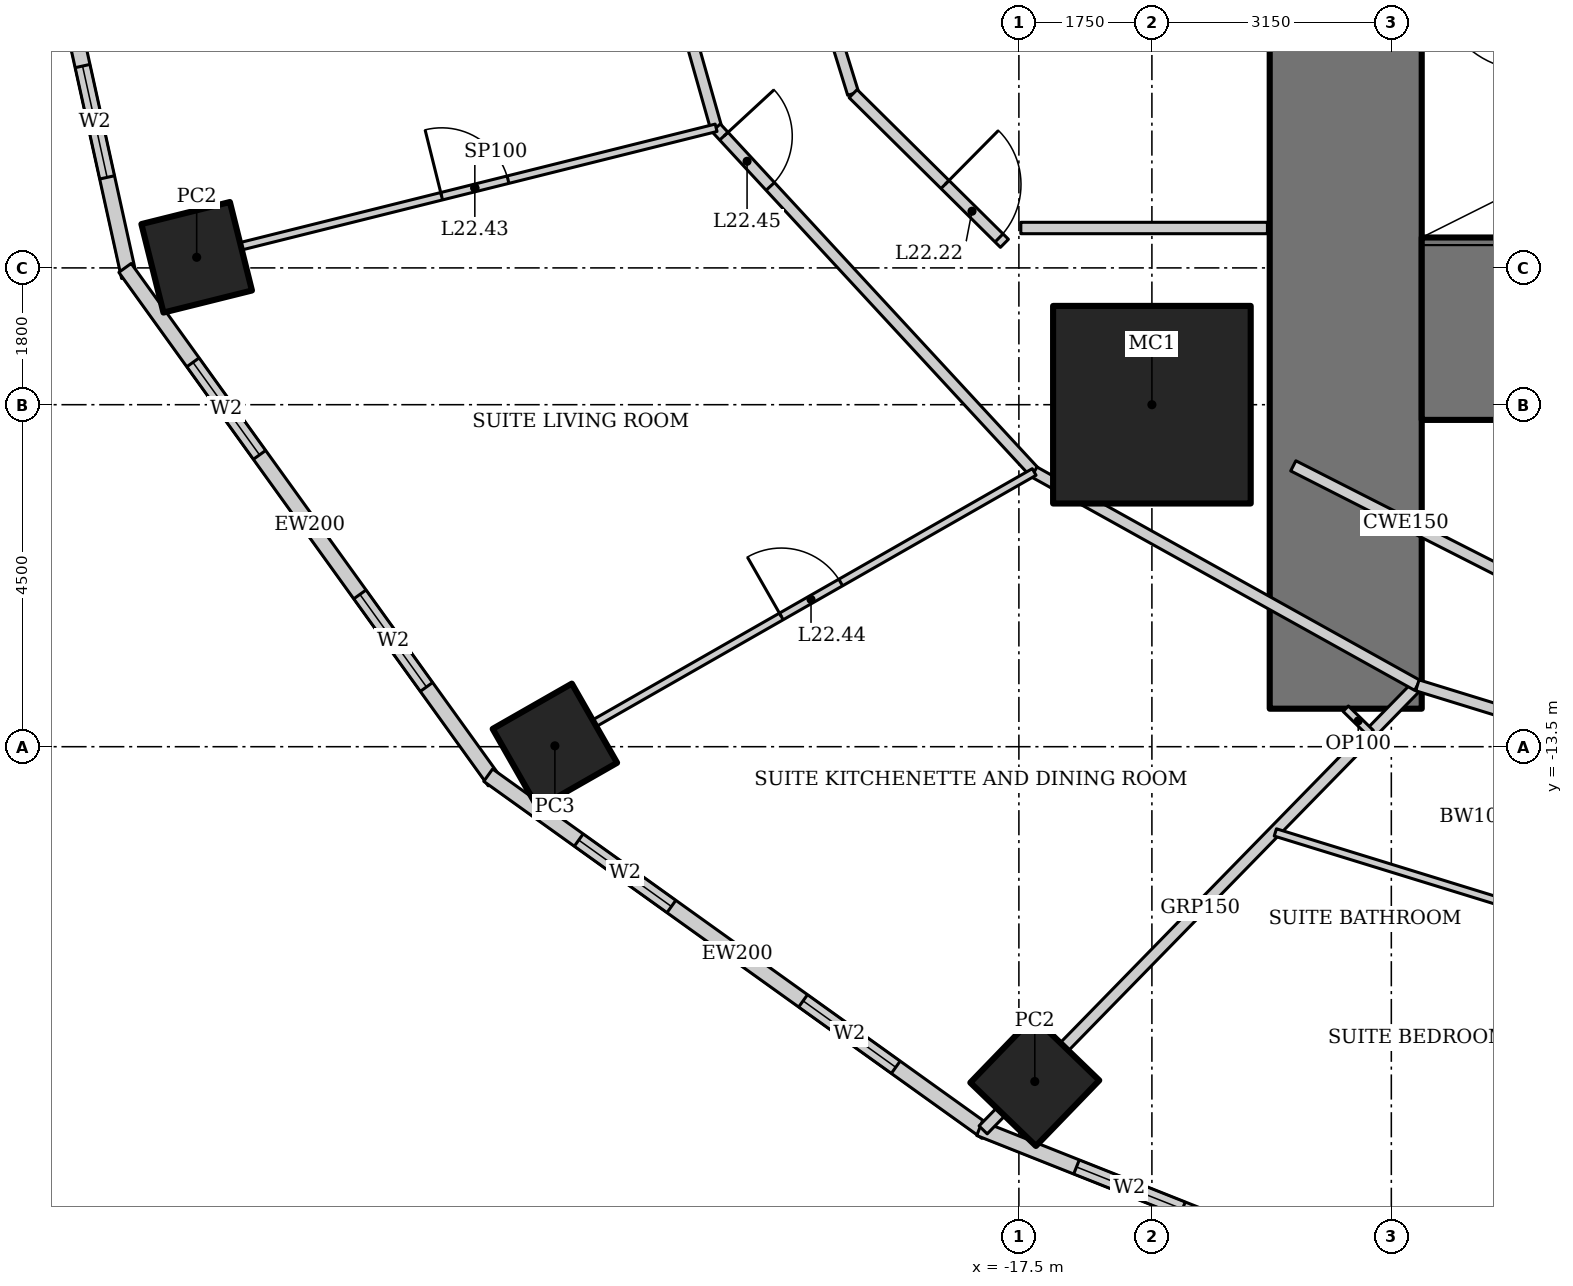
"""IFC4 building model, lengths in metres.
Left out: names, types, materials, properties, quantities, classifications, styles, units other than length and angle.
Written with IfcOpenShell. Run it as: python <this file> out.ifc"""

import sys

from ifc_helpers import new_model, si_unit, direction, frame, frame_2d, origin, origin_2d, place, context, subcontext, project, spatial, rectangle, hollow_rectangle, extrude, element, fill, save


model = new_model("IFC4")
c1 = context("Model", 3, precision=1e-05, world=origin(), true_north=direction((0.0, 1.0)))
c2 = subcontext(c1, "Body", "Model", "MODEL_VIEW")
j1 = project(units=[si_unit("LENGTHUNIT", "METRE"), si_unit("PLANEANGLEUNIT", "RADIAN")], contexts=[c1])
p1 = place(None, origin())
s1 = spatial("IfcSite", under=j1, at=p1, CompositionType="ELEMENT")
p2 = place(p1, origin())
s2 = spatial("IfcBuilding", under=s1, at=p2, CompositionType="ELEMENT")
p3 = place(p2, frame((0.0, 0.0, 94.6)))
s3 = spatial("IfcBuildingStorey", under=s2, at=p3, CompositionType="ELEMENT", Elevation=94.6)
p4 = place(p3, frame((-15.75, -9.0, 0.0), z_axis=(0.0, 0.0, 1.0), x_axis=(1.0, 0.0, 0.0)))
e1 = element("IfcColumn", 1, at=p4, inside=s3, PredefinedType="COLUMN", context=c2, shape_type="SweptSolid", body=[
    extrude(hollow_rectangle(XDim=2.6, YDim=2.6, WallThickness=0.13, at=origin_2d()), origin(), (0.0, 0.0, 1.0), 3.6),
])
p5 = place(p3, frame((-28.318, -7.06, 0.0), z_axis=(0.0, 0.0, 1.0), x_axis=(0.970295726276, 0.2419218956, 0.0)))
e2 = element("IfcColumn", 2, at=p5, inside=s3, PredefinedType="COLUMN", context=c2, shape_type="SweptSolid", body=[
    extrude(hollow_rectangle(XDim=1.2, YDim=1.2, WallThickness=0.1, at=origin_2d()), origin(), (0.0, 0.0, 1.0), 3.6),
])
p6 = place(p3, frame((-23.605, -13.489, 0.0), z_axis=(0.0, 0.0, 1.0), x_axis=(0.86824298017, 0.496139221777, 0.0)))
e3 = element("IfcColumn", 3, at=p6, inside=s3, PredefinedType="COLUMN", context=c2, shape_type="SweptSolid", body=[
    extrude(hollow_rectangle(XDim=1.2, YDim=1.2, WallThickness=0.12, at=origin_2d()), origin(), (0.0, 0.0, 1.0), 3.6),
])
p7 = place(p3, frame((-17.291, -17.905, 0.0), z_axis=(0.0, 0.0, 1.0), x_axis=(0.694658370459, 0.719339800339, 0.0)))
e4 = element("IfcColumn", 4, at=p7, inside=s3, PredefinedType="COLUMN", context=c2, shape_type="SweptSolid", body=[
    extrude(hollow_rectangle(XDim=1.2, YDim=1.2, WallThickness=0.1, at=origin_2d()), origin(), (0.0, 0.0, 1.0), 3.6),
])
p8 = place(p3, frame((-13.2, 13.0, 0.0), z_axis=(0.0, 0.0, 1.0), x_axis=(0.0, -1.0, 0.0)))
e5 = element("IfcWall", 5, at=p8, inside=s3, PredefinedType="SHEAR", context=c2, shape_type="SweptSolid", body=[
    extrude(rectangle(XDim=26.0, YDim=2.0, at=frame_2d((13.0, 0.0))), origin(), (0.0, 0.0, 1.0), 3.6),
])
p9 = place(p8, frame((12.1, 0.0, 0.0)))
e6 = element("IfcOpeningElement", 6, at=p9, cuts=e5, PredefinedType="OPENING", context=c2, shape_type="SweptSolid", body=[
    extrude(rectangle(XDim=1.8, YDim=2.1, at=frame_2d((0.9, 1.05))), frame((0.0, 1.01, 0.0), z_axis=(0.0, -1.0, 0.0), x_axis=(1.0, 0.0, 0.0)), (0.0, 0.0, 1.0), 2.02),
])
p10 = place(p3, frame((-12.2, -8.0, 0.0), z_axis=(0.0, 0.0, 1.0), x_axis=(1.0, 0.0, 0.0)))
e7 = element("IfcWall", 7, at=p10, inside=s3, PredefinedType="SHEAR", context=c2, shape_type="SweptSolid", body=[
    extrude(rectangle(XDim=24.4, YDim=2.4, at=frame_2d((12.2, 0.0))), origin(), (0.0, 0.0, 1.0), 3.6),
])
p11 = place(p3, frame((-30.835, 0.067, 0.0), z_axis=(0.0, 0.0, 1.0), x_axis=(0.215238065514, -0.976561608478, 0.0)))
e8 = element("IfcWall", 8, at=p11, inside=s3, PredefinedType="SOLIDWALL", context=c2, shape_type="SweptSolid", body=[
    extrude(rectangle(XDim=7.562, YDim=0.2, at=frame_2d((3.781, 0.0))), origin(), (0.0, 0.0, 1.0), 3.45),
])
p12 = place(p11, frame((1.341, 0.0, 0.5)))
e9 = element("IfcOpeningElement", 9, at=p12, cuts=e8, PredefinedType="OPENING", context=c2, shape_type="SweptSolid", body=[
    extrude(rectangle(XDim=1.5, YDim=2.2, at=frame_2d((0.75, 1.1))), frame((0.0, 0.11, 0.0), z_axis=(0.0, -1.0, 0.0), x_axis=(1.0, 0.0, 0.0)), (0.0, 0.0, 1.0), 0.22),
])
p13 = place(p11, frame((4.722, 0.0, 0.5)))
e10 = element("IfcOpeningElement", 10, at=p13, cuts=e8, PredefinedType="OPENING", context=c2, shape_type="SweptSolid", body=[
    extrude(rectangle(XDim=1.5, YDim=2.2, at=frame_2d((0.75, 1.1))), frame((0.0, 0.11, 0.0), z_axis=(0.0, -1.0, 0.0), x_axis=(1.0, 0.0, 0.0)), (0.0, 0.0, 1.0), 0.22),
])
p14 = place(p3, frame((-29.26, -7.2, 0.0), z_axis=(0.0, 0.0, 1.0), x_axis=(0.583937613703, -0.811798536155, 0.0)))
e11 = element("IfcWall", 11, at=p14, inside=s3, PredefinedType="SOLIDWALL", context=c2, shape_type="SweptSolid", body=[
    extrude(rectangle(XDim=8.323, YDim=0.2, at=frame_2d((4.162, 0.0))), origin(), (0.0, 0.0, 1.0), 3.45),
])
p15 = place(p14, frame((1.531, 0.0, 0.5)))
e12 = element("IfcOpeningElement", 12, at=p15, cuts=e11, PredefinedType="OPENING", context=c2, shape_type="SweptSolid", body=[
    extrude(rectangle(XDim=1.5, YDim=2.2, at=frame_2d((0.75, 1.1))), frame((0.0, 0.11, 0.0), z_axis=(0.0, -1.0, 0.0), x_axis=(1.0, 0.0, 0.0)), (0.0, 0.0, 1.0), 0.22),
])
p16 = place(p14, frame((5.292, 0.0, 0.5)))
e13 = element("IfcOpeningElement", 13, at=p16, cuts=e11, PredefinedType="OPENING", context=c2, shape_type="SweptSolid", body=[
    extrude(rectangle(XDim=1.5, YDim=2.2, at=frame_2d((0.75, 1.1))), frame((0.0, 0.11, 0.0), z_axis=(0.0, -1.0, 0.0), x_axis=(1.0, 0.0, 0.0)), (0.0, 0.0, 1.0), 0.22),
])
p17 = place(p3, frame((-24.482, -13.875, 0.0), z_axis=(0.0, 0.0, 1.0), x_axis=(0.812791321576, -0.582554948112, 0.0)))
e14 = element("IfcWall", 14, at=p17, inside=s3, PredefinedType="SOLIDWALL", context=c2, shape_type="SweptSolid", body=[
    extrude(rectangle(XDim=8.063, YDim=0.2, at=frame_2d((4.032, 0.0))), origin(), (0.0, 0.0, 1.0), 3.45),
])
p18 = place(p17, frame((1.466, 0.0, 0.5)))
e15 = element("IfcOpeningElement", 15, at=p18, cuts=e14, PredefinedType="OPENING", context=c2, shape_type="SweptSolid", body=[
    extrude(rectangle(XDim=1.5, YDim=2.2, at=frame_2d((0.75, 1.1))), frame((0.0, 0.11, 0.0), z_axis=(0.0, -1.0, 0.0), x_axis=(1.0, 0.0, 0.0)), (0.0, 0.0, 1.0), 0.22),
])
p19 = place(p17, frame((5.097, 0.0, 0.5)))
e16 = element("IfcOpeningElement", 16, at=p19, cuts=e14, PredefinedType="OPENING", context=c2, shape_type="SweptSolid", body=[
    extrude(rectangle(XDim=1.5, YDim=2.2, at=frame_2d((0.75, 1.1))), frame((0.0, 0.11, 0.0), z_axis=(0.0, -1.0, 0.0), x_axis=(1.0, 0.0, 0.0)), (0.0, 0.0, 1.0), 0.22),
])
p20 = place(p3, frame((-18.018, -18.523, 0.0), z_axis=(0.0, 0.0, 1.0), x_axis=(0.929358351251, -0.369178892895, 0.0)))
e17 = element("IfcWall", 17, at=p20, inside=s3, PredefinedType="SOLIDWALL", context=c2, shape_type="SweptSolid", body=[
    extrude(rectangle(XDim=7.692, YDim=0.2, at=frame_2d((3.846, 0.0))), origin(), (0.0, 0.0, 1.0), 3.45),
])
p21 = place(p20, frame((1.373, 0.0, 0.5)))
e18 = element("IfcOpeningElement", 18, at=p21, cuts=e17, PredefinedType="OPENING", context=c2, shape_type="SweptSolid", body=[
    extrude(rectangle(XDim=1.5, YDim=2.2, at=frame_2d((0.75, 1.1))), frame((0.0, 0.11, 0.0), z_axis=(0.0, -1.0, 0.0), x_axis=(1.0, 0.0, 0.0)), (0.0, 0.0, 1.0), 0.22),
])
p22 = place(p20, frame((4.819, 0.0, 0.5)))
e19 = element("IfcOpeningElement", 19, at=p22, cuts=e17, PredefinedType="OPENING", context=c2, shape_type="SweptSolid", body=[
    extrude(rectangle(XDim=1.5, YDim=2.2, at=frame_2d((0.75, 1.1))), frame((0.0, 0.11, 0.0), z_axis=(0.0, -1.0, 0.0), x_axis=(1.0, 0.0, 0.0)), (0.0, 0.0, 1.0), 0.22),
])
p23 = place(p3, frame((-17.97, -18.542, 0.0), z_axis=(0.0, 0.0, 1.0), x_axis=(0.698757291878, 0.715358823981, 0.0)))
e20 = element("IfcWall", 20, at=p23, inside=s3, PredefinedType="PARTITIONING", context=c2, shape_type="SweptSolid", body=[
    extrude(rectangle(XDim=8.177, YDim=0.15, at=frame_2d((4.088, 0.0))), origin(), (0.0, 0.0, 1.0), 2.528),
])
p24 = place(p3, frame((-23.0, 0.0, 0.0), z_axis=(0.0, 0.0, 1.0), x_axis=(0.272386051236, -0.962188047677, 0.0)))
e21 = element("IfcWall", 21, at=p24, inside=s3, PredefinedType="PARTITIONING", context=c2, shape_type="SweptSolid", body=[
    extrude(rectangle(XDim=5.567, YDim=0.15, at=frame_2d((2.783, 0.0))), origin(), (0.0, 0.0, 1.0), 3.45),
])
p25 = place(p3, frame((-21.484, -5.356, 0.0), z_axis=(0.0, 0.0, 1.0), x_axis=(0.678641806296, -0.734469399463, 0.0)))
e22 = element("IfcWall", 22, at=p25, inside=s3, PredefinedType="PARTITIONING", context=c2, shape_type="SweptSolid", body=[
    extrude(rectangle(XDim=6.166, YDim=0.15, at=frame_2d((3.083, 0.0))), origin(), (0.0, 0.0, 1.0), 3.45),
])
p26 = place(p25, frame((0.15, 0.0, 0.0)))
e23 = element("IfcOpeningElement", 23, at=p26, cuts=e22, PredefinedType="OPENING", context=c2, shape_type="SweptSolid", body=[
    extrude(rectangle(XDim=0.9, YDim=2.1, at=frame_2d((0.45, 1.05))), frame((0.0, 0.085, 0.0), z_axis=(0.0, -1.0, 0.0), x_axis=(1.0, 0.0, 0.0)), (0.0, 0.0, 1.0), 0.17),
])
p27 = place(p3, frame((-17.299, -9.885, 0.0), z_axis=(0.0, 0.0, 1.0), x_axis=(0.873695910579, -0.486472461541, 0.0)))
e24 = element("IfcWall", 24, at=p27, inside=s3, PredefinedType="PARTITIONING", context=c2, shape_type="SweptSolid", body=[
    extrude(rectangle(XDim=5.771, YDim=0.15, at=frame_2d((2.885, 0.0))), origin(), (0.0, 0.0, 1.0), 3.45),
])
p28 = place(p3, frame((-12.257, -12.693, 0.0), z_axis=(0.0, 0.0, 1.0), x_axis=(0.955657956744, -0.294478980085, 0.0)))
e25 = element("IfcWall", 25, at=p28, inside=s3, PredefinedType="PARTITIONING", context=c2, shape_type="SweptSolid", body=[
    extrude(rectangle(XDim=5.236, YDim=0.15, at=frame_2d((2.618, 0.0))), origin(), (0.0, 0.0, 1.0), 3.45),
])
p29 = place(p3, frame((-20.921, -0.9, 0.0), z_axis=(0.0, 0.0, 1.0), x_axis=(0.295778570807, -0.955256529447, 0.0)))
e26 = element("IfcWall", 26, at=p29, inside=s3, PredefinedType="PARTITIONING", context=c2, shape_type="SweptSolid", body=[
    extrude(rectangle(XDim=4.195, YDim=0.15, at=frame_2d((2.097, 0.0))), origin(), (0.0, 0.0, 1.0), 3.45),
])
p30 = place(p3, frame((-27.833, -6.939, 0.0), z_axis=(0.0, 0.0, 1.0), x_axis=(0.970295936837, 0.241921051083, 0.0)))
e27 = element("IfcWall", 27, at=p30, inside=s3, PredefinedType="PARTITIONING", context=c2, shape_type="SweptSolid", body=[
    extrude(rectangle(XDim=6.543, YDim=0.1, at=frame_2d((3.272, 0.0))), origin(), (0.0, 0.0, 1.0), 2.332),
])
p31 = place(p30, frame((2.822, 0.0, 0.0)))
e28 = element("IfcOpeningElement", 28, at=p31, cuts=e27, PredefinedType="OPENING", context=c2, shape_type="SweptSolid", body=[
    extrude(rectangle(XDim=0.9, YDim=2.1, at=frame_2d((0.45, 1.05))), frame((0.0, 0.06, 0.0), z_axis=(0.0, -1.0, 0.0), x_axis=(1.0, 0.0, 0.0)), (0.0, 0.0, 1.0), 0.12),
])
p32 = place(p3, frame((-23.171, -13.24, 0.0), z_axis=(0.0, 0.0, 1.0), x_axis=(0.868249806728, 0.496127275118, 0.0)))
e29 = element("IfcWall", 29, at=p32, inside=s3, PredefinedType="PARTITIONING", context=c2, shape_type="SweptSolid", body=[
    extrude(rectangle(XDim=6.763, YDim=0.1, at=frame_2d((3.381, 0.0))), origin(), (0.0, 0.0, 1.0), 2.693),
])
p33 = place(p32, frame((2.931, 0.0, 0.0)))
e30 = element("IfcOpeningElement", 30, at=p33, cuts=e29, PredefinedType="OPENING", context=c2, shape_type="SweptSolid", body=[
    extrude(rectangle(XDim=0.9, YDim=2.1, at=frame_2d((0.45, 1.05))), frame((0.0, 0.06, 0.0), z_axis=(0.0, -1.0, 0.0), x_axis=(1.0, 0.0, 0.0)), (0.0, 0.0, 1.0), 0.12),
])
p34 = place(p3, frame((-11.052, -15.575, 0.0), z_axis=(0.0, 0.0, 1.0), x_axis=(-0.955641033268, 0.294533895391, 0.0)))
e31 = element("IfcWall", 31, at=p34, inside=s3, PredefinedType="PARTITIONING", context=c2, shape_type="SweptSolid", body=[
    extrude(rectangle(XDim=3.216, YDim=0.1, at=frame_2d((1.608, 0.0))), origin(), (0.0, 0.0, 1.0), 3.45),
])
p35 = place(p3, frame((-13.2, -13.0, 0.0), z_axis=(0.0, 0.0, 1.0), x_axis=(0.715289751842, -0.698827998087, 0.0)))
e32 = element("IfcWall", 32, at=p35, inside=s3, PredefinedType="PARTITIONING", context=c2, shape_type="SweptSolid", body=[
    extrude(rectangle(XDim=0.46, YDim=0.1, at=frame_2d((0.23, 0.0))), origin(), (0.0, 0.0, 1.0), 3.45),
])
p36 = place(p3, frame((-19.681, -4.907, 0.0), z_axis=(0.0, 0.0, 1.0), x_axis=(0.710845937688, -0.70334774676, 0.0)))
e33 = element("IfcWall", 33, at=p36, inside=s3, PredefinedType="PARTITIONING", context=c2, shape_type="SweptSolid", body=[
    extrude(rectangle(XDim=2.8, YDim=0.15, at=frame_2d((1.4, 0.0))), origin(), (0.0, 0.0, 1.0), 3.45),
])
p37 = place(p36, frame((1.7, 0.0, 0.0)))
e34 = element("IfcOpeningElement", 34, at=p37, cuts=e33, PredefinedType="OPENING", context=c2, shape_type="SweptSolid", body=[
    extrude(rectangle(XDim=1.0, YDim=2.1, at=frame_2d((0.5, 1.05))), frame((0.0, 0.085, 0.0), z_axis=(0.0, -1.0, 0.0), x_axis=(1.0, 0.0, 0.0)), (0.0, 0.0, 1.0), 0.17),
])
p38 = place(p3, frame((-13.89, -9.805, 0.0), z_axis=(0.0, 0.0, 1.0), x_axis=(0.891398195277, -0.453220980821, 0.0)))
e35 = element("IfcWall", 35, at=p38, inside=s3, PredefinedType="PARTITIONING", context=c2, shape_type="SweptSolid", body=[
    extrude(rectangle(XDim=3.327, YDim=0.15, at=frame_2d((1.664, 0.0))), origin(), (0.0, 0.0, 1.0), 3.45),
])
p39 = place(p3, frame((-17.475, -6.675, 0.0), z_axis=(0.0, 0.0, 1.0), x_axis=(1.0, 0.0, 0.0)))
e36 = element("IfcWall", 36, at=p39, inside=s3, PredefinedType="PARTITIONING", context=c2, shape_type="SweptSolid", body=[
    extrude(rectangle(XDim=3.245, YDim=0.15, at=frame_2d((1.622, 0.0))), origin(), (0.0, 0.0, 1.0), 3.45),
])
p40 = place(p13, origin())
e37 = element("IfcWindow", 37, at=p40, inside=s3, PartitioningType="SINGLE_PANEL", PredefinedType="WINDOW", context=c2, shape_type="SweptSolid", body=[
    extrude(rectangle(XDim=1.5, YDim=2.2, at=frame_2d((0.75, 1.1))), frame((0.0, 0.03, 0.0), z_axis=(0.0, -1.0, 0.0), x_axis=(1.0, 0.0, 0.0)), (0.0, 0.0, 1.0), 0.06),
])
fill(e10, e37)
p41 = place(p15, origin())
e38 = element("IfcWindow", 38, at=p41, inside=s3, PartitioningType="SINGLE_PANEL", PredefinedType="WINDOW", context=c2, shape_type="SweptSolid", body=[
    extrude(rectangle(XDim=1.5, YDim=2.2, at=frame_2d((0.75, 1.1))), frame((0.0, 0.03, 0.0), z_axis=(0.0, -1.0, 0.0), x_axis=(1.0, 0.0, 0.0)), (0.0, 0.0, 1.0), 0.06),
])
fill(e12, e38)
p42 = place(p16, origin())
e39 = element("IfcWindow", 39, at=p42, inside=s3, PartitioningType="SINGLE_PANEL", PredefinedType="WINDOW", context=c2, shape_type="SweptSolid", body=[
    extrude(rectangle(XDim=1.5, YDim=2.2, at=frame_2d((0.75, 1.1))), frame((0.0, 0.03, 0.0), z_axis=(0.0, -1.0, 0.0), x_axis=(1.0, 0.0, 0.0)), (0.0, 0.0, 1.0), 0.06),
])
fill(e13, e39)
p43 = place(p18, origin())
e40 = element("IfcWindow", 40, at=p43, inside=s3, PartitioningType="SINGLE_PANEL", PredefinedType="WINDOW", context=c2, shape_type="SweptSolid", body=[
    extrude(rectangle(XDim=1.5, YDim=2.2, at=frame_2d((0.75, 1.1))), frame((0.0, 0.03, 0.0), z_axis=(0.0, -1.0, 0.0), x_axis=(1.0, 0.0, 0.0)), (0.0, 0.0, 1.0), 0.06),
])
fill(e15, e40)
p44 = place(p19, origin())
e41 = element("IfcWindow", 41, at=p44, inside=s3, PartitioningType="SINGLE_PANEL", PredefinedType="WINDOW", context=c2, shape_type="SweptSolid", body=[
    extrude(rectangle(XDim=1.5, YDim=2.2, at=frame_2d((0.75, 1.1))), frame((0.0, 0.03, 0.0), z_axis=(0.0, -1.0, 0.0), x_axis=(1.0, 0.0, 0.0)), (0.0, 0.0, 1.0), 0.06),
])
fill(e16, e41)
p45 = place(p21, origin())
e42 = element("IfcWindow", 42, at=p45, inside=s3, PartitioningType="SINGLE_PANEL", PredefinedType="WINDOW", context=c2, shape_type="SweptSolid", body=[
    extrude(rectangle(XDim=1.5, YDim=2.2, at=frame_2d((0.75, 1.1))), frame((0.0, 0.03, 0.0), z_axis=(0.0, -1.0, 0.0), x_axis=(1.0, 0.0, 0.0)), (0.0, 0.0, 1.0), 0.06),
])
fill(e18, e42)
p46 = place(p37, origin())
e43 = element("IfcDoor", 43, at=p46, inside=s3, OperationType="SINGLE_SWING_LEFT", PredefinedType="DOOR", context=c2, shape_type="SweptSolid", body=[
    extrude(rectangle(XDim=1.0, YDim=2.1, at=frame_2d((0.5, 1.05))), frame((0.0, 0.025, 0.0), z_axis=(0.0, -1.0, 0.0), x_axis=(1.0, 0.0, 0.0)), (0.0, 0.0, 1.0), 0.05),
])
fill(e34, e43)
p47 = place(p31, origin())
e44 = element("IfcDoor", 44, at=p47, inside=s3, OperationType="SINGLE_SWING_LEFT", PredefinedType="DOOR", context=c2, shape_type="SweptSolid", body=[
    extrude(rectangle(XDim=0.9, YDim=2.1, at=frame_2d((0.45, 1.05))), frame((0.0, 0.025, 0.0), z_axis=(0.0, -1.0, 0.0), x_axis=(1.0, 0.0, 0.0)), (0.0, 0.0, 1.0), 0.05),
])
fill(e28, e44)
p48 = place(p33, origin())
e45 = element("IfcDoor", 45, at=p48, inside=s3, OperationType="SINGLE_SWING_LEFT", PredefinedType="DOOR", context=c2, shape_type="SweptSolid", body=[
    extrude(rectangle(XDim=0.9, YDim=2.1, at=frame_2d((0.45, 1.05))), frame((0.0, 0.025, 0.0), z_axis=(0.0, -1.0, 0.0), x_axis=(1.0, 0.0, 0.0)), (0.0, 0.0, 1.0), 0.05),
])
fill(e30, e45)
p49 = place(p26, origin())
e46 = element("IfcDoor", 46, at=p49, inside=s3, OperationType="SINGLE_SWING_LEFT", PredefinedType="DOOR", context=c2, shape_type="SweptSolid", body=[
    extrude(rectangle(XDim=0.9, YDim=2.1, at=frame_2d((0.45, 1.05))), frame((0.0, 0.025, 0.0), z_axis=(0.0, -1.0, 0.0), x_axis=(1.0, 0.0, 0.0)), (0.0, 0.0, 1.0), 0.05),
])
fill(e23, e46)
save(model, sys.argv[1])
